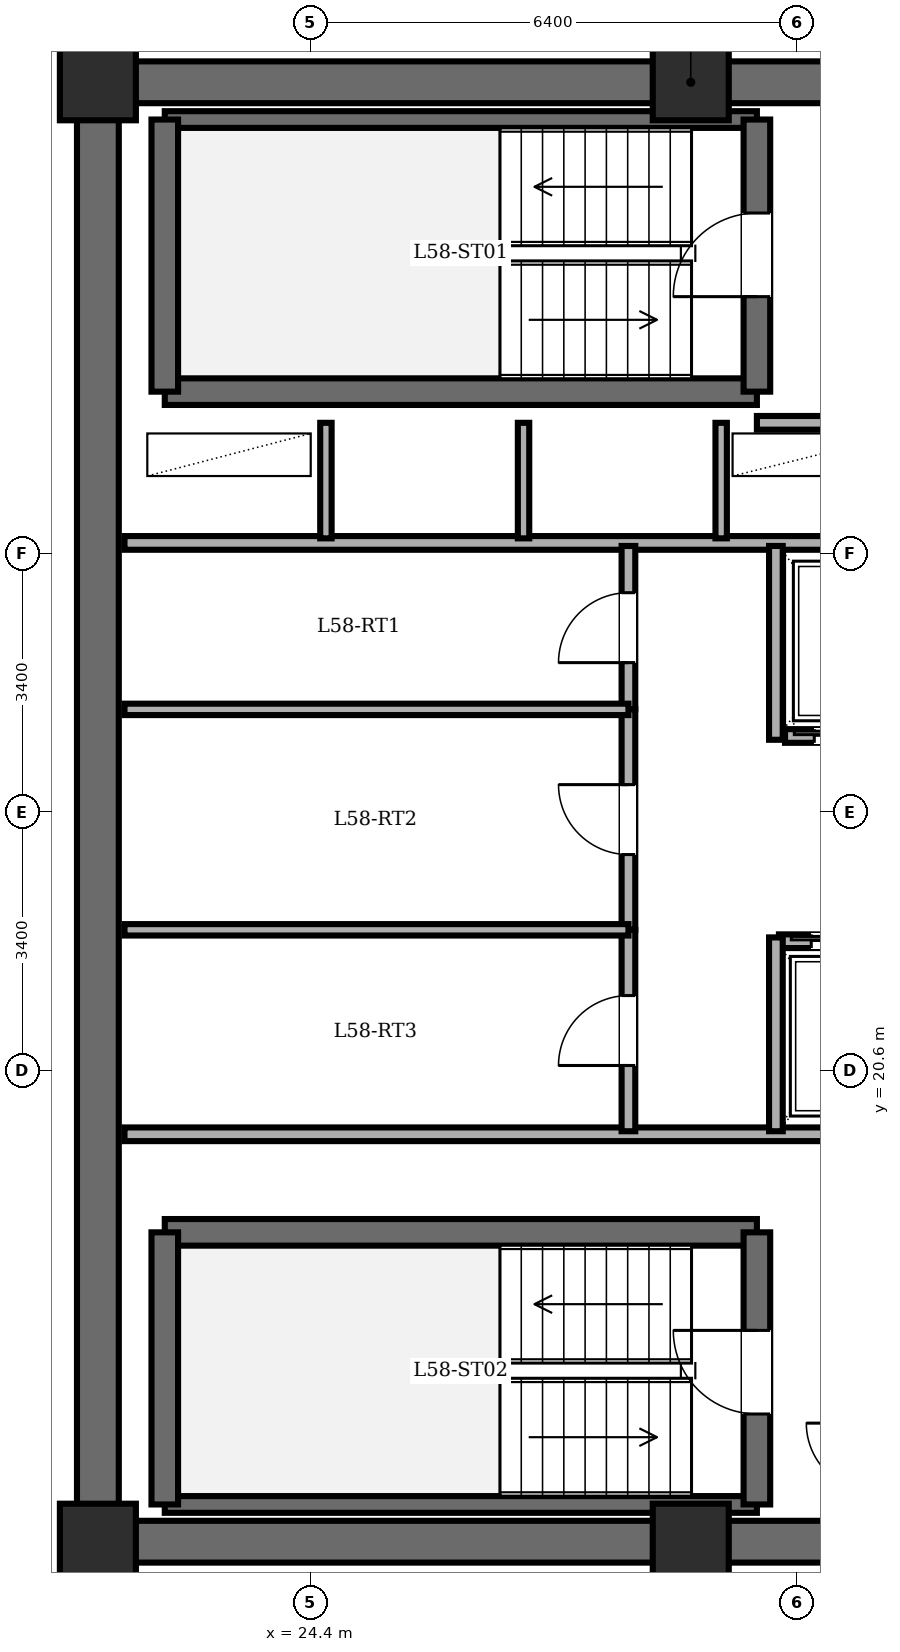
"""IFC4 building model, lengths in metres.
Left out: names, types, materials, properties, quantities, classifications, styles, units other than length and angle.
Written with IfcOpenShell. Run it as: python <this file> out.ifc"""

import sys

from ifc_helpers import new_model, si_unit, direction, frame, frame_2d, origin, origin_2d, place, context, subcontext, project, spatial, rectangle, extrude, element, fill, save


model = new_model("IFC4")
c1 = context("Model", 3, precision=1e-05, world=origin(), true_north=direction((0.0, 1.0)))
c2 = subcontext(c1, "Body", "Model", "MODEL_VIEW")
j1 = project(units=[si_unit("LENGTHUNIT", "METRE"), si_unit("PLANEANGLEUNIT", "RADIAN")], contexts=[c1])
p1 = place(None, origin())
s1 = spatial("IfcSite", under=j1, at=p1, CompositionType="ELEMENT")
p2 = place(p1, origin())
s2 = spatial("IfcBuilding", under=s1, at=p2, CompositionType="ELEMENT")
p3 = place(p2, frame((0.0, 0.0, 222.9)))
s3 = spatial("IfcBuildingStorey", under=s2, at=p3, CompositionType="ELEMENT", Elevation=222.9)
for number, where, z_axis, x_axis in (
    (1, (21.6, 14.4, 0.0), (0.0, 0.0, 1.0), (1.0, 0.0, 0.0)),
    (2, (29.4, 14.4, 0.0), (0.0, 0.0, 1.0), (1.0, 0.0, 0.0)),
    (3, (29.4, 33.6, 0.0), (0.0, 0.0, 1.0), (1.0, 0.0, 0.0)),
    (4, (21.6, 33.6, 0.0), (0.0, 0.0, 1.0), (1.0, 0.0, 0.0)),
):
    element("IfcColumn", number, at=place(p3, frame(where, z_axis=z_axis, x_axis=x_axis)), inside=s3, PredefinedType="COLUMN", context=c2, shape_type="SweptSolid", body=[
        extrude(rectangle(XDim=1.0, YDim=1.0, at=origin_2d()), origin(), (0.0, 0.0, 1.0), 3.6),
    ])
p4 = place(p3, frame((21.6, 14.4, 0.0), z_axis=(0.0, 0.0, 1.0), x_axis=(0.0, 1.0, 0.0)))
e5 = element("IfcWall", 5, at=p4, inside=s3, PredefinedType="SHEAR", context=c2, shape_type="SweptSolid", body=[
    extrude(rectangle(XDim=19.2, YDim=0.55, at=frame_2d((9.6, 0.0))), origin(), (0.0, 0.0, 1.0), 3.4),
])
for number, where, z_axis, x_axis in (
    (6, (21.6, 33.6, 0.0), (0.0, 0.0, 1.0), (1.0, 0.0, 0.0)),
    (7, (37.2, 14.4, 0.0), (0.0, 0.0, 1.0), (-1.0, 0.0, 0.0)),
):
    element("IfcWall", number, at=place(p3, frame(where, z_axis=z_axis, x_axis=x_axis)), inside=s3, PredefinedType="SHEAR", context=c2, shape_type="SweptSolid", body=[
        extrude(rectangle(XDim=15.6, YDim=0.55, at=frame_2d((7.8, 0.0))), origin(), (0.0, 0.0, 1.0), 3.4),
    ])
p5 = place(p3, frame((22.48, 29.53, 0.0), z_axis=(0.0, 0.0, 1.0), x_axis=(1.0, 0.0, 0.0)))
e8 = element("IfcWall", 8, at=p5, inside=s3, PredefinedType="SOLIDWALL", context=c2, shape_type="SweptSolid", body=[
    extrude(rectangle(XDim=7.79, YDim=0.35, at=frame_2d((3.895, 0.0))), origin(), (0.0, 0.0, 1.0), 3.4),
])
p6 = place(p3, frame((22.48, 33.11, 0.0), z_axis=(0.0, 0.0, 1.0), x_axis=(1.0, 0.0, 0.0)))
e9 = element("IfcWall", 9, at=p6, inside=s3, PredefinedType="PARTITIONING", context=c2, shape_type="SweptSolid", body=[
    extrude(rectangle(XDim=7.79, YDim=0.22, at=frame_2d((3.895, 0.0))), origin(), (0.0, 0.0, 1.0), 3.4),
])
p7 = place(p3, frame((22.48, 29.53, 0.0), z_axis=(0.0, 0.0, 1.0), x_axis=(0.0, 1.0, 0.0)))
e10 = element("IfcWall", 10, at=p7, inside=s3, PredefinedType="SOLIDWALL", context=c2, shape_type="SweptSolid", body=[
    extrude(rectangle(XDim=3.58, YDim=0.35, at=frame_2d((1.79, 0.0))), origin(), (0.0, 0.0, 1.0), 3.4),
])
p8 = place(p3, frame((30.27, 29.53, 0.0), z_axis=(0.0, 0.0, 1.0), x_axis=(0.0, 1.0, 0.0)))
e11 = element("IfcWall", 11, at=p8, inside=s3, PredefinedType="SOLIDWALL", context=c2, shape_type="SweptSolid", body=[
    extrude(rectangle(XDim=3.58, YDim=0.35, at=frame_2d((1.79, 0.0))), origin(), (0.0, 0.0, 1.0), 3.4),
])
p9 = place(p8, frame((1.25, 0.0, 0.0)))
e12 = element("IfcOpeningElement", 12, at=p9, cuts=e11, PredefinedType="OPENING", context=c2, shape_type="SweptSolid", body=[
    extrude(rectangle(XDim=1.1, YDim=2.15, at=frame_2d((0.55, 1.075))), frame((0.0, 0.185, 0.0), z_axis=(0.0, -1.0, 0.0), x_axis=(1.0, 0.0, 0.0)), (0.0, 0.0, 1.0), 0.37),
])
p10 = place(p3, frame((22.48, 18.47, 0.0), z_axis=(0.0, 0.0, 1.0), x_axis=(1.0, 0.0, 0.0)))
e13 = element("IfcWall", 13, at=p10, inside=s3, PredefinedType="SOLIDWALL", context=c2, shape_type="SweptSolid", body=[
    extrude(rectangle(XDim=7.79, YDim=0.35, at=frame_2d((3.895, 0.0))), origin(), (0.0, 0.0, 1.0), 3.4),
])
p11 = place(p3, frame((22.48, 14.89, 0.0), z_axis=(0.0, 0.0, 1.0), x_axis=(1.0, 0.0, 0.0)))
e14 = element("IfcWall", 14, at=p11, inside=s3, PredefinedType="PARTITIONING", context=c2, shape_type="SweptSolid", body=[
    extrude(rectangle(XDim=7.79, YDim=0.22, at=frame_2d((3.895, 0.0))), origin(), (0.0, 0.0, 1.0), 3.4),
])
p12 = place(p3, frame((22.48, 14.89, 0.0), z_axis=(0.0, 0.0, 1.0), x_axis=(0.0, 1.0, 0.0)))
e15 = element("IfcWall", 15, at=p12, inside=s3, PredefinedType="SOLIDWALL", context=c2, shape_type="SweptSolid", body=[
    extrude(rectangle(XDim=3.58, YDim=0.35, at=frame_2d((1.79, 0.0))), origin(), (0.0, 0.0, 1.0), 3.4),
])
p13 = place(p3, frame((30.27, 14.89, 0.0), z_axis=(0.0, 0.0, 1.0), x_axis=(0.0, 1.0, 0.0)))
e16 = element("IfcWall", 16, at=p13, inside=s3, PredefinedType="SOLIDWALL", context=c2, shape_type="SweptSolid", body=[
    extrude(rectangle(XDim=3.58, YDim=0.35, at=frame_2d((1.79, 0.0))), origin(), (0.0, 0.0, 1.0), 3.4),
])
p14 = place(p13, frame((1.19, 0.0, 0.0)))
e17 = element("IfcOpeningElement", 17, at=p14, cuts=e16, PredefinedType="OPENING", context=c2, shape_type="SweptSolid", body=[
    extrude(rectangle(XDim=1.1, YDim=2.15, at=frame_2d((0.55, 1.075))), frame((0.0, 0.185, 0.0), z_axis=(0.0, -1.0, 0.0), x_axis=(1.0, 0.0, 0.0)), (0.0, 0.0, 1.0), 0.37),
])
p15 = place(p3, frame((30.27, 29.12, 0.0), z_axis=(0.0, 0.0, 1.0), x_axis=(1.0, 0.0, 0.0)))
e18 = element("IfcWall", 18, at=p15, inside=s3, PredefinedType="PARTITIONING", context=c2, shape_type="SweptSolid", body=[
    extrude(rectangle(XDim=2.24, YDim=0.18, at=frame_2d((1.12, 0.0))), origin(), (0.0, 0.0, 1.0), 3.4),
])
p16 = place(p3, frame((21.95, 27.54, 0.0), z_axis=(0.0, 0.0, 1.0), x_axis=(1.0, 0.0, 0.0)))
e19 = element("IfcWall", 19, at=p16, inside=s3, PredefinedType="PARTITIONING", context=c2, shape_type="SweptSolid", body=[
    extrude(rectangle(XDim=10.56, YDim=0.18, at=frame_2d((5.28, 0.0))), origin(), (0.0, 0.0, 1.0), 3.4),
])
for number, where, z_axis, x_axis in (
    (20, (24.6, 27.6, 0.0), (0.0, 0.0, 1.0), (0.0, 1.0, 0.0)),
    (21, (27.2, 27.6, 0.0), (0.0, 0.0, 1.0), (0.0, 1.0, 0.0)),
    (22, (29.8, 27.6, 0.0), (0.0, 0.0, 1.0), (0.0, 1.0, 0.0)),
):
    element("IfcWall", number, at=place(p3, frame(where, z_axis=z_axis, x_axis=x_axis)), inside=s3, PredefinedType="PARTITIONING", context=c2, shape_type="SweptSolid", body=[
        extrude(rectangle(XDim=1.52, YDim=0.15, at=frame_2d((0.76, 0.0))), origin(), (0.0, 0.0, 1.0), 3.4),
    ])
p17 = place(p3, frame((21.95, 19.76, 0.0), z_axis=(0.0, 0.0, 1.0), x_axis=(1.0, 0.0, 0.0)))
e23 = element("IfcWall", 23, at=p17, inside=s3, PredefinedType="PARTITIONING", context=c2, shape_type="SweptSolid", body=[
    extrude(rectangle(XDim=14.87, YDim=0.18, at=frame_2d((7.435, 0.0))), origin(), (0.0, 0.0, 1.0), 3.4),
])
p18 = place(p3, frame((32.46, 25.0, 0.0), z_axis=(0.0, 0.0, 1.0), x_axis=(-1.0, 0.0, 0.0)))
e24 = element("IfcWall", 24, at=p18, inside=s3, PredefinedType="PARTITIONING", context=c2, shape_type="SweptSolid", body=[
    extrude(rectangle(XDim=1.82, YDim=0.18, at=frame_2d((0.91, 0.0))), origin(), (0.0, 0.0, 1.0), 3.4),
])
p19 = place(p18, frame((0.385, 0.0, 0.0)))
e25 = element("IfcOpeningElement", 25, at=p19, cuts=e24, PredefinedType="OPENING", context=c2, shape_type="SweptSolid", body=[
    extrude(rectangle(XDim=1.05, YDim=2.2, at=frame_2d((0.525, 1.1))), frame((0.0, 0.1, 0.0), z_axis=(0.0, -1.0, 0.0), x_axis=(1.0, 0.0, 0.0)), (0.0, 0.0, 1.0), 0.2),
])
p20 = place(p3, frame((30.56, 22.3, 0.0), z_axis=(0.0, 0.0, 1.0), x_axis=(1.0, 0.0, 0.0)))
e26 = element("IfcWall", 26, at=p20, inside=s3, PredefinedType="PARTITIONING", context=c2, shape_type="SweptSolid", body=[
    extrude(rectangle(XDim=1.9, YDim=0.18, at=frame_2d((0.95, 0.0))), origin(), (0.0, 0.0, 1.0), 3.4),
])
p21 = place(p20, frame((0.425, 0.0, 0.0)))
e27 = element("IfcOpeningElement", 27, at=p21, cuts=e26, PredefinedType="OPENING", context=c2, shape_type="SweptSolid", body=[
    extrude(rectangle(XDim=1.05, YDim=2.2, at=frame_2d((0.525, 1.1))), frame((0.0, 0.1, 0.0), z_axis=(0.0, -1.0, 0.0), x_axis=(1.0, 0.0, 0.0)), (0.0, 0.0, 1.0), 0.2),
])
for number, where, z_axis, x_axis in (
    (28, (30.52, 24.95, 0.0), (0.0, 0.0, 1.0), (0.0, 1.0, 0.0)),
    (29, (30.52, 19.8, 0.0), (0.0, 0.0, 1.0), (0.0, 1.0, 0.0)),
):
    element("IfcWall", number, at=place(p3, frame(where, z_axis=z_axis, x_axis=x_axis)), inside=s3, PredefinedType="PARTITIONING", context=c2, shape_type="SweptSolid", body=[
        extrude(rectangle(XDim=2.55, YDim=0.18, at=frame_2d((1.275, 0.0))), origin(), (0.0, 0.0, 1.0), 3.4),
    ])
p22 = place(p3, frame((28.58, 25.35, 0.0), z_axis=(0.0, 0.0, 1.0), x_axis=(0.0, 1.0, 0.0)))
e30 = element("IfcWall", 30, at=p22, inside=s3, PredefinedType="PARTITIONING", context=c2, shape_type="SweptSolid", body=[
    extrude(rectangle(XDim=2.15, YDim=0.18, at=frame_2d((1.075, 0.0))), origin(), (0.0, 0.0, 1.0), 3.4),
])
p23 = place(p22, frame((0.615, 0.0, 0.0)))
e31 = element("IfcOpeningElement", 31, at=p23, cuts=e30, PredefinedType="OPENING", context=c2, shape_type="SweptSolid", body=[
    extrude(rectangle(XDim=0.92, YDim=2.1, at=frame_2d((0.46, 1.05))), frame((0.0, 0.1, 0.0), z_axis=(0.0, -1.0, 0.0), x_axis=(1.0, 0.0, 0.0)), (0.0, 0.0, 1.0), 0.2),
])
p24 = place(p3, frame((28.58, 22.45, 0.0), z_axis=(0.0, 0.0, 1.0), x_axis=(0.0, 1.0, 0.0)))
e32 = element("IfcWall", 32, at=p24, inside=s3, PredefinedType="PARTITIONING", context=c2, shape_type="SweptSolid", body=[
    extrude(rectangle(XDim=2.9, YDim=0.18, at=frame_2d((1.45, 0.0))), origin(), (0.0, 0.0, 1.0), 3.4),
])
p25 = place(p24, frame((0.99, 0.0, 0.0)))
e33 = element("IfcOpeningElement", 33, at=p25, cuts=e32, PredefinedType="OPENING", context=c2, shape_type="SweptSolid", body=[
    extrude(rectangle(XDim=0.92, YDim=2.1, at=frame_2d((0.46, 1.05))), frame((0.0, 0.1, 0.0), z_axis=(0.0, -1.0, 0.0), x_axis=(1.0, 0.0, 0.0)), (0.0, 0.0, 1.0), 0.2),
])
p26 = place(p3, frame((28.58, 19.8, 0.0), z_axis=(0.0, 0.0, 1.0), x_axis=(0.0, 1.0, 0.0)))
e34 = element("IfcWall", 34, at=p26, inside=s3, PredefinedType="PARTITIONING", context=c2, shape_type="SweptSolid", body=[
    extrude(rectangle(XDim=2.65, YDim=0.18, at=frame_2d((1.325, 0.0))), origin(), (0.0, 0.0, 1.0), 3.4),
])
p27 = place(p26, frame((0.865, 0.0, 0.0)))
e35 = element("IfcOpeningElement", 35, at=p27, cuts=e34, PredefinedType="OPENING", context=c2, shape_type="SweptSolid", body=[
    extrude(rectangle(XDim=0.92, YDim=2.1, at=frame_2d((0.46, 1.05))), frame((0.0, 0.1, 0.0), z_axis=(0.0, -1.0, 0.0), x_axis=(1.0, 0.0, 0.0)), (0.0, 0.0, 1.0), 0.2),
])
for number, where, z_axis, x_axis in (
    (36, (21.95, 25.35, 0.0), (0.0, 0.0, 1.0), (1.0, 0.0, 0.0)),
    (37, (21.95, 22.45, 0.0), (0.0, 0.0, 1.0), (1.0, 0.0, 0.0)),
):
    element("IfcWall", number, at=place(p3, frame(where, z_axis=z_axis, x_axis=x_axis)), inside=s3, PredefinedType="PARTITIONING", context=c2, shape_type="SweptSolid", body=[
        extrude(rectangle(XDim=6.63, YDim=0.15, at=frame_2d((3.315, 0.0))), origin(), (0.0, 0.0, 1.0), 3.4),
    ])
p28 = place(p9, origin())
e38 = element("IfcDoor", 38, at=p28, inside=s3, OperationType="SINGLE_SWING_LEFT", PredefinedType="DOOR", context=c2, shape_type="SweptSolid", body=[
    extrude(rectangle(XDim=1.1, YDim=2.15, at=frame_2d((0.55, 1.075))), frame((0.0, 0.025, 0.0), z_axis=(0.0, -1.0, 0.0), x_axis=(1.0, 0.0, 0.0)), (0.0, 0.0, 1.0), 0.05),
])
fill(e12, e38)
p29 = place(p14, origin())
e39 = element("IfcDoor", 39, at=p29, inside=s3, OperationType="SINGLE_SWING_RIGHT", PredefinedType="DOOR", context=c2, shape_type="SweptSolid", body=[
    extrude(rectangle(XDim=1.1, YDim=2.15, at=frame_2d((0.55, 1.075))), frame((0.0, 0.025, 0.0), z_axis=(0.0, -1.0, 0.0), x_axis=(1.0, 0.0, 0.0)), (0.0, 0.0, 1.0), 0.05),
])
fill(e17, e39)
p30 = place(p19, origin())
e40 = element("IfcDoor", 40, at=p30, inside=s3, OperationType="DOUBLE_DOOR_SLIDING", PredefinedType="DOOR", context=c2, shape_type="SweptSolid", body=[
    extrude(rectangle(XDim=1.05, YDim=2.2, at=frame_2d((0.525, 1.1))), frame((0.0, 0.025, 0.0), z_axis=(0.0, -1.0, 0.0), x_axis=(1.0, 0.0, 0.0)), (0.0, 0.0, 1.0), 0.05),
])
fill(e25, e40)
p31 = place(p21, origin())
e41 = element("IfcDoor", 41, at=p31, inside=s3, OperationType="DOUBLE_DOOR_SLIDING", PredefinedType="DOOR", context=c2, shape_type="SweptSolid", body=[
    extrude(rectangle(XDim=1.05, YDim=2.2, at=frame_2d((0.525, 1.1))), frame((0.0, 0.025, 0.0), z_axis=(0.0, -1.0, 0.0), x_axis=(1.0, 0.0, 0.0)), (0.0, 0.0, 1.0), 0.05),
])
fill(e27, e41)
p32 = place(p23, origin())
e42 = element("IfcDoor", 42, at=p32, inside=s3, OperationType="SINGLE_SWING_LEFT", PredefinedType="DOOR", context=c2, shape_type="SweptSolid", body=[
    extrude(rectangle(XDim=0.92, YDim=2.1, at=frame_2d((0.46, 1.05))), frame((0.0, 0.025, 0.0), z_axis=(0.0, -1.0, 0.0), x_axis=(1.0, 0.0, 0.0)), (0.0, 0.0, 1.0), 0.05),
])
fill(e31, e42)
p33 = place(p25, origin())
e43 = element("IfcDoor", 43, at=p33, inside=s3, OperationType="SINGLE_SWING_RIGHT", PredefinedType="DOOR", context=c2, shape_type="SweptSolid", body=[
    extrude(rectangle(XDim=0.92, YDim=2.1, at=frame_2d((0.46, 1.05))), frame((0.0, 0.025, 0.0), z_axis=(0.0, -1.0, 0.0), x_axis=(1.0, 0.0, 0.0)), (0.0, 0.0, 1.0), 0.05),
])
fill(e33, e43)
p34 = place(p27, origin())
e44 = element("IfcDoor", 44, at=p34, inside=s3, OperationType="SINGLE_SWING_LEFT", PredefinedType="DOOR", context=c2, shape_type="SweptSolid", body=[
    extrude(rectangle(XDim=0.92, YDim=2.1, at=frame_2d((0.46, 1.05))), frame((0.0, 0.025, 0.0), z_axis=(0.0, -1.0, 0.0), x_axis=(1.0, 0.0, 0.0)), (0.0, 0.0, 1.0), 0.05),
])
fill(e35, e44)
save(model, sys.argv[1])
